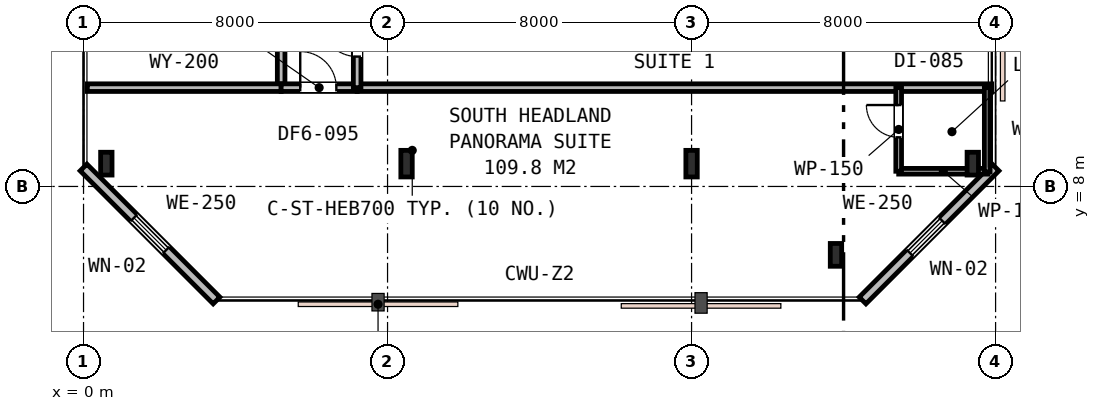
"""IFC4 building model, lengths in metres.
Left out: names, types, materials, properties, quantities, classifications, styles, units other than length and angle.
Written with IfcOpenShell. Run it as: python <this file> out.ifc"""

import sys

from ifc_helpers import new_model, si_unit, direction, frame, frame_2d, origin, origin_2d, place, context, subcontext, project, spatial, rectangle, i_section, extrude, element, fill, save


model = new_model("IFC4")
c1 = context("Model", 3, precision=1e-05, world=origin(), true_north=direction((0.0, 1.0)))
c2 = subcontext(c1, "Body", "Model", "MODEL_VIEW")
j1 = project(units=[si_unit("LENGTHUNIT", "METRE"), si_unit("PLANEANGLEUNIT", "RADIAN")], contexts=[c1])
p1 = place(None, origin())
s1 = spatial("IfcSite", under=j1, at=p1, CompositionType="ELEMENT")
p2 = place(p1, origin())
s2 = spatial("IfcBuilding", under=s1, at=p2, CompositionType="ELEMENT")
p3 = place(p2, frame((0.0, 0.0, 126.0)))
s3 = spatial("IfcBuildingStorey", under=s2, at=p3, CompositionType="ELEMENT", Elevation=126.0)
for number, where, z_axis, x_axis in (
    (1, (0.6, 8.6, 0.0), (0.0, 0.0, 1.0), (1.0, 0.0, 0.0)),
    (2, (19.8, 6.2, 0.0), (0.0, 0.0, 1.0), (1.0, 0.0, 0.0)),
    (3, (23.4, 8.6, 0.0), (0.0, 0.0, 1.0), (1.0, 0.0, 0.0)),
):
    element("IfcColumn", number, at=place(p3, frame(where, z_axis=z_axis, x_axis=x_axis)), inside=s3, PredefinedType="COLUMN", context=c2, shape_type="SweptSolid", body=[
        extrude(i_section(OverallWidth=0.3, OverallDepth=0.6, WebThickness=0.015, FlangeThickness=0.03, FilletRadius=0.027, at=origin_2d()), origin(), (0.0, 0.0, 1.0), 3.6),
    ])
for number, where, z_axis, x_axis in (
    (4, (8.5, 8.6, 0.0), (0.0, 0.0, 1.0), (1.0, 0.0, 0.0)),
    (5, (16.0, 8.6, 0.0), (0.0, 0.0, 1.0), (1.0, 0.0, 0.0)),
):
    element("IfcColumn", number, at=place(p3, frame(where, z_axis=z_axis, x_axis=x_axis)), inside=s3, PredefinedType="COLUMN", context=c2, shape_type="SweptSolid", body=[
        extrude(i_section(OverallWidth=0.3, OverallDepth=0.7, WebThickness=0.017, FlangeThickness=0.032, FilletRadius=0.027, at=origin_2d()), origin(), (0.0, 0.0, 1.0), 3.6),
    ])
p4 = place(p3, frame((20.5, 5.0, 0.0), z_axis=(0.0, 0.0, 1.0), x_axis=(0.707106781187, 0.707106781187, 0.0)))
e6 = element("IfcWall", 6, at=p4, inside=s3, PredefinedType="STANDARD", context=c2, shape_type="SweptSolid", body=[
    extrude(rectangle(XDim=4.95, YDim=0.25, at=frame_2d((2.475, 0.0))), origin(), (0.0, 0.0, 1.0), 3.33),
])
p5 = place(p4, frame((1.765, 0.0, 0.85)))
e7 = element("IfcOpeningElement", 7, at=p5, cuts=e6, PredefinedType="OPENING", context=c2, shape_type="SweptSolid", body=[
    extrude(rectangle(XDim=1.2, YDim=1.6, at=frame_2d((0.6, 0.8))), frame((0.0, 0.135, 0.0), z_axis=(0.0, -1.0, 0.0), x_axis=(1.0, 0.0, 0.0)), (0.0, 0.0, 1.0), 0.27),
])
p6 = place(p3, frame((0.0, 8.5, 0.0), z_axis=(0.0, 0.0, 1.0), x_axis=(0.707106781187, -0.707106781187, 0.0)))
e8 = element("IfcWall", 8, at=p6, inside=s3, PredefinedType="STANDARD", context=c2, shape_type="SweptSolid", body=[
    extrude(rectangle(XDim=4.95, YDim=0.25, at=frame_2d((2.475, 0.0))), origin(), (0.0, 0.0, 1.0), 3.33),
])
p7 = place(p6, frame((1.875, 0.0, 0.85)))
e9 = element("IfcOpeningElement", 9, at=p7, cuts=e8, PredefinedType="OPENING", context=c2, shape_type="SweptSolid", body=[
    extrude(rectangle(XDim=1.2, YDim=1.6, at=frame_2d((0.6, 0.8))), frame((0.0, 0.135, 0.0), z_axis=(0.0, -1.0, 0.0), x_axis=(1.0, 0.0, 0.0)), (0.0, 0.0, 1.0), 0.27),
])
p8 = place(p3, frame((5.2, 10.6, 0.0), z_axis=(0.0, 0.0, 1.0), x_axis=(0.0, 1.0, 0.0)))
e10 = element("IfcWall", 10, at=p8, inside=s3, PredefinedType="PARTITIONING", context=c2, shape_type="SweptSolid", body=[
    extrude(rectangle(XDim=20.2, YDim=0.2, at=frame_2d((10.1, 0.0))), origin(), (0.0, 0.0, 1.0), 2.87),
])
p9 = place(p8, frame((8.425, 0.0, 0.0)))
e11 = element("IfcOpeningElement", 11, at=p9, cuts=e10, PredefinedType="OPENING", context=c2, shape_type="SweptSolid", body=[
    extrude(rectangle(XDim=0.95, YDim=2.15, at=frame_2d((0.475, 1.075))), frame((0.0, 0.11, 0.0), z_axis=(0.0, -1.0, 0.0), x_axis=(1.0, 0.0, 0.0)), (0.0, 0.0, 1.0), 0.22),
])
p10 = place(p8, frame((14.68, 0.0, 0.0)))
e12 = element("IfcOpeningElement", 12, at=p10, cuts=e10, PredefinedType="OPENING", context=c2, shape_type="SweptSolid", body=[
    extrude(rectangle(XDim=0.95, YDim=2.15, at=frame_2d((0.475, 1.075))), frame((0.0, 0.11, 0.0), z_axis=(0.0, -1.0, 0.0), x_axis=(1.0, 0.0, 0.0)), (0.0, 0.0, 1.0), 0.22),
])
p11 = place(p8, frame((3.225, 0.0, 0.0)))
e13 = element("IfcOpeningElement", 13, at=p11, cuts=e10, PredefinedType="OPENING", context=c2, shape_type="SweptSolid", body=[
    extrude(rectangle(XDim=0.95, YDim=2.15, at=frame_2d((0.475, 1.075))), frame((0.0, 0.11, 0.0), z_axis=(0.0, -1.0, 0.0), x_axis=(1.0, 0.0, 0.0)), (0.0, 0.0, 1.0), 0.22),
])
p12 = place(p3, frame((0.1, 10.6, 0.0), z_axis=(0.0, 0.0, 1.0), x_axis=(1.0, 0.0, 0.0)))
e14 = element("IfcWall", 14, at=p12, inside=s3, PredefinedType="PARTITIONING", context=c2, shape_type="SweptSolid", body=[
    extrude(rectangle(XDim=5.1, YDim=0.2, at=frame_2d((2.55, 0.0))), origin(), (0.0, 0.0, 1.0), 2.96),
])
p13 = place(p3, frame((7.2, 10.6, 0.0), z_axis=(0.0, 0.0, 1.0), x_axis=(1.0, 0.0, 0.0)))
e15 = element("IfcWall", 15, at=p13, inside=s3, PredefinedType="PARTITIONING", context=c2, shape_type="SweptSolid", body=[
    extrude(rectangle(XDim=16.7, YDim=0.2, at=frame_2d((8.35, 0.0))), origin(), (0.0, 0.0, 1.0), 2.87),
])
p14 = place(p3, frame((5.2, 10.6, 0.0), z_axis=(0.0, 0.0, 1.0), x_axis=(1.0, 0.0, 0.0)))
e16 = element("IfcWall", 16, at=p14, inside=s3, PredefinedType="PARTITIONING", context=c2, shape_type="SweptSolid", body=[
    extrude(rectangle(XDim=2.0, YDim=0.2, at=frame_2d((1.0, 0.0))), origin(), (0.0, 0.0, 1.0), 3.01),
])
p15 = place(p14, frame((0.502, 0.0, 0.0)))
e17 = element("IfcOpeningElement", 17, at=p15, cuts=e16, PredefinedType="OPENING", context=c2, shape_type="SweptSolid", body=[
    extrude(rectangle(XDim=0.95, YDim=2.15, at=frame_2d((0.475, 1.075))), frame((0.0, 0.11, 0.0), z_axis=(0.0, -1.0, 0.0), x_axis=(1.0, 0.0, 0.0)), (0.0, 0.0, 1.0), 0.22),
])
p16 = place(p3, frame((21.45, 8.4, 0.0), z_axis=(0.0, 0.0, 1.0), x_axis=(1.0, 0.0, 0.0)))
e18 = element("IfcWall", 18, at=p16, inside=s3, PredefinedType="PARTITIONING", context=c2, shape_type="SweptSolid", body=[
    extrude(rectangle(XDim=2.35, YDim=0.15, at=frame_2d((1.175, 0.0))), origin(), (0.0, 0.0, 1.0), 2.87),
])
p17 = place(p3, frame((21.45, 8.4, 0.0), z_axis=(0.0, 0.0, 1.0), x_axis=(0.0, 1.0, 0.0)))
e19 = element("IfcWall", 19, at=p17, inside=s3, PredefinedType="PARTITIONING", context=c2, shape_type="SweptSolid", body=[
    extrude(rectangle(XDim=2.2, YDim=0.15, at=frame_2d((1.1, 0.0))), origin(), (0.0, 0.0, 1.0), 2.87),
])
p18 = place(p17, frame((0.892, 0.0, 0.0)))
e20 = element("IfcOpeningElement", 20, at=p18, cuts=e19, PredefinedType="OPENING", context=c2, shape_type="SweptSolid", body=[
    extrude(rectangle(XDim=0.85, YDim=2.15, at=frame_2d((0.425, 1.075))), frame((0.0, 0.085, 0.0), z_axis=(0.0, -1.0, 0.0), x_axis=(1.0, 0.0, 0.0)), (0.0, 0.0, 1.0), 0.17),
])
p19 = place(p3, frame((23.78, 10.6, 0.0), z_axis=(0.0, 0.0, 1.0), x_axis=(0.0, -1.0, 0.0)))
e21 = element("IfcWall", 21, at=p19, inside=s3, PredefinedType="PARTITIONING", context=c2, shape_type="SweptSolid", body=[
    extrude(rectangle(XDim=2.22, YDim=0.15, at=frame_2d((1.11, 0.0))), origin(), (0.0, 0.0, 1.0), 2.87),
])
p20 = place(p3, frame((7.2, 10.6, 0.0), z_axis=(0.0, 0.0, 1.0), x_axis=(0.0, 1.0, 0.0)))
e22 = element("IfcWall", 22, at=p20, inside=s3, PredefinedType="PARTITIONING", context=c2, shape_type="SweptSolid", body=[
    extrude(rectangle(XDim=18.0, YDim=0.2, at=frame_2d((9.0, 0.0))), origin(), (0.0, 0.0, 1.0), 2.87),
])
p21 = place(p20, frame((0.818, 0.0, 0.0)))
e23 = element("IfcOpeningElement", 23, at=p21, cuts=e22, PredefinedType="OPENING", context=c2, shape_type="SweptSolid", body=[
    extrude(rectangle(XDim=0.95, YDim=2.15, at=frame_2d((0.475, 1.075))), frame((0.0, 0.11, 0.0), z_axis=(0.0, -1.0, 0.0), x_axis=(1.0, 0.0, 0.0)), (0.0, 0.0, 1.0), 0.22),
])
p22 = place(p20, frame((5.169, 0.0, 0.0)))
e24 = element("IfcOpeningElement", 24, at=p22, cuts=e22, PredefinedType="OPENING", context=c2, shape_type="SweptSolid", body=[
    extrude(rectangle(XDim=0.95, YDim=2.15, at=frame_2d((0.475, 1.075))), frame((0.0, 0.11, 0.0), z_axis=(0.0, -1.0, 0.0), x_axis=(1.0, 0.0, 0.0)), (0.0, 0.0, 1.0), 0.22),
])
p23 = place(p20, frame((9.815, 0.0, 0.0)))
e25 = element("IfcOpeningElement", 25, at=p23, cuts=e22, PredefinedType="OPENING", context=c2, shape_type="SweptSolid", body=[
    extrude(rectangle(XDim=0.95, YDim=2.15, at=frame_2d((0.475, 1.075))), frame((0.0, 0.11, 0.0), z_axis=(0.0, -1.0, 0.0), x_axis=(1.0, 0.0, 0.0)), (0.0, 0.0, 1.0), 0.22),
])
p24 = place(p20, frame((15.325, 0.0, 0.0)))
e26 = element("IfcOpeningElement", 26, at=p24, cuts=e22, PredefinedType="OPENING", context=c2, shape_type="SweptSolid", body=[
    extrude(rectangle(XDim=0.95, YDim=2.15, at=frame_2d((0.475, 1.075))), frame((0.0, 0.11, 0.0), z_axis=(0.0, -1.0, 0.0), x_axis=(1.0, 0.0, 0.0)), (0.0, 0.0, 1.0), 0.22),
])
p25 = place(p5, origin())
e27 = element("IfcWindow", 27, at=p25, inside=s3, PartitioningType="SINGLE_PANEL", PredefinedType="WINDOW", context=c2, shape_type="SweptSolid", body=[
    extrude(rectangle(XDim=1.2, YDim=1.6, at=frame_2d((0.6, 0.8))), frame((0.0, 0.03, 0.0), z_axis=(0.0, -1.0, 0.0), x_axis=(1.0, 0.0, 0.0)), (0.0, 0.0, 1.0), 0.06),
])
fill(e7, e27)
p26 = place(p7, origin())
e28 = element("IfcWindow", 28, at=p26, inside=s3, PartitioningType="SINGLE_PANEL", PredefinedType="WINDOW", context=c2, shape_type="SweptSolid", body=[
    extrude(rectangle(XDim=1.2, YDim=1.6, at=frame_2d((0.6, 0.8))), frame((0.0, 0.03, 0.0), z_axis=(0.0, -1.0, 0.0), x_axis=(1.0, 0.0, 0.0)), (0.0, 0.0, 1.0), 0.06),
])
fill(e9, e28)
p27 = place(p15, origin())
e29 = element("IfcDoor", 29, at=p27, inside=s3, OperationType="SINGLE_SWING_LEFT", PredefinedType="DOOR", context=c2, shape_type="SweptSolid", body=[
    extrude(rectangle(XDim=0.95, YDim=2.15, at=frame_2d((0.475, 1.075))), frame((0.0, 0.025, 0.0), z_axis=(0.0, -1.0, 0.0), x_axis=(1.0, 0.0, 0.0)), (0.0, 0.0, 1.0), 0.05),
])
fill(e17, e29)
p28 = place(p18, origin())
e30 = element("IfcDoor", 30, at=p28, inside=s3, OperationType="SINGLE_SWING_RIGHT", PredefinedType="DOOR", context=c2, shape_type="SweptSolid", body=[
    extrude(rectangle(XDim=0.85, YDim=2.15, at=frame_2d((0.425, 1.075))), frame((0.0, 0.025, 0.0), z_axis=(0.0, -1.0, 0.0), x_axis=(1.0, 0.0, 0.0)), (0.0, 0.0, 1.0), 0.05),
])
fill(e20, e30)
p29 = place(p21, origin())
e31 = element("IfcDoor", 31, at=p29, inside=s3, OperationType="SINGLE_SWING_RIGHT", PredefinedType="DOOR", context=c2, shape_type="SweptSolid", body=[
    extrude(rectangle(XDim=0.95, YDim=2.15, at=frame_2d((0.475, 1.075))), frame((0.0, 0.025, 0.0), z_axis=(0.0, -1.0, 0.0), x_axis=(1.0, 0.0, 0.0)), (0.0, 0.0, 1.0), 0.05),
])
fill(e23, e31)
save(model, sys.argv[1])
